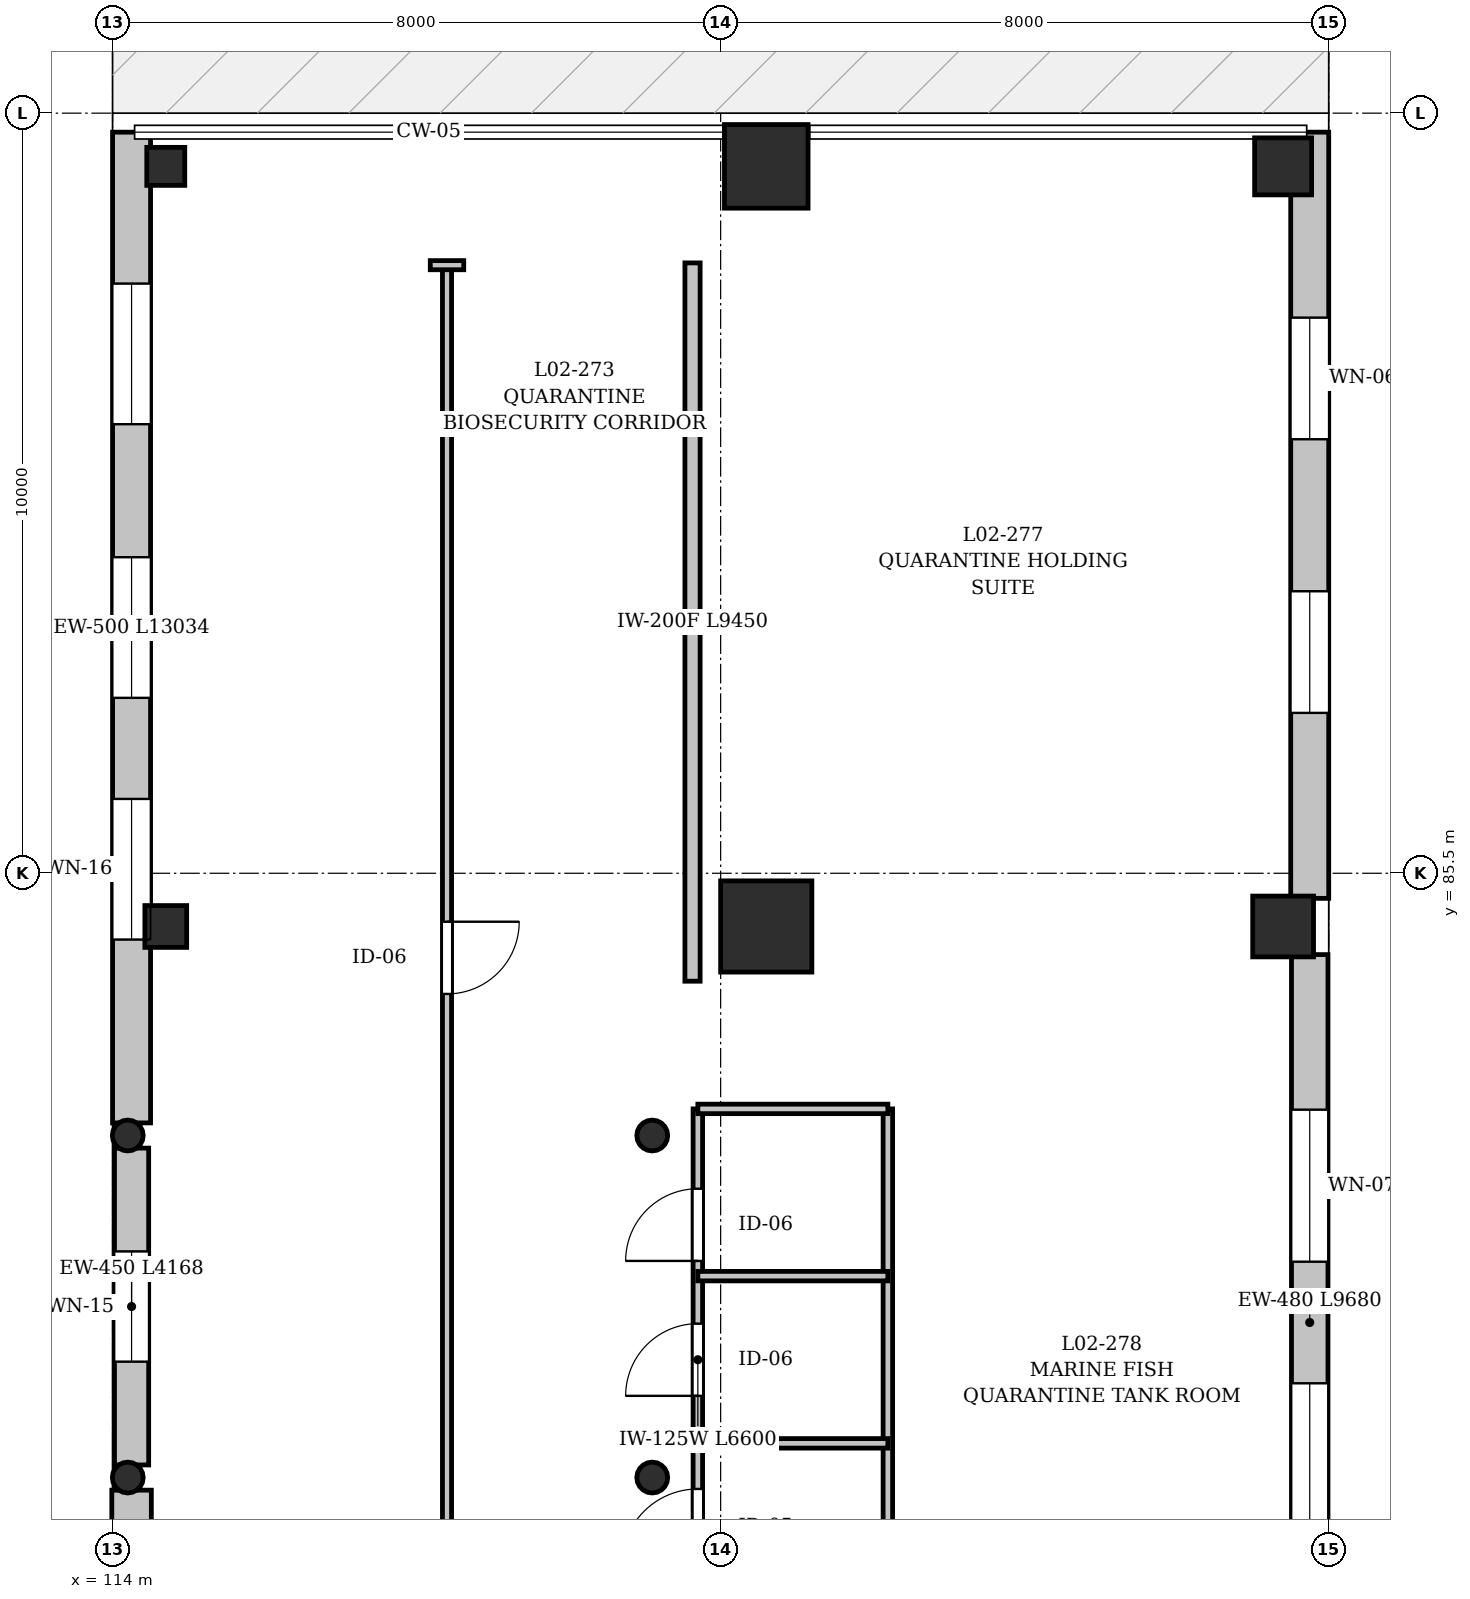
"""IFC4 building model, lengths in metres.
Left out: names, types, materials, properties, quantities, classifications, styles, units other than length and angle.
Written with IfcOpenShell. Run it as: python <this file> out.ifc"""

import sys

from ifc_helpers import new_model, si_unit, direction, frame, frame_2d, origin, origin_2d, place, context, subcontext, project, spatial, rectangle, hollow_circle, extrude, element, fill, save


model = new_model("IFC4")
c1 = context("Model", 3, precision=1e-05, world=origin(), true_north=direction((0.0, 1.0)))
c2 = subcontext(c1, "Body", "Model", "MODEL_VIEW")
j1 = project(units=[si_unit("LENGTHUNIT", "METRE"), si_unit("PLANEANGLEUNIT", "RADIAN")], contexts=[c1])
p1 = place(None, origin())
s1 = spatial("IfcSite", under=j1, at=p1, CompositionType="ELEMENT")
p2 = place(p1, origin())
s2 = spatial("IfcBuilding", under=s1, at=p2, CompositionType="ELEMENT")
p3 = place(p2, frame((0.0, 0.0, 5.4)))
s3 = spatial("IfcBuildingStorey", under=s2, at=p3, CompositionType="ELEMENT", Elevation=5.4)
p4 = place(p3, frame((114.7, 84.8, 0.0), z_axis=(0.0, 0.0, 1.0), x_axis=(1.0, 0.0, 0.0)))
e1 = element("IfcColumn", 1, at=p4, inside=s3, PredefinedType="COLUMN", context=c2, shape_type="SweptSolid", body=[
    extrude(rectangle(XDim=0.55, YDim=0.55, at=origin_2d()), origin(), (0.0, 0.0, 1.0), 4.45),
])
p5 = place(p3, frame((114.7, 94.8, 0.0), z_axis=(0.0, 0.0, 1.0), x_axis=(1.0, 0.0, 0.0)))
e2 = element("IfcColumn", 2, at=p5, inside=s3, PredefinedType="COLUMN", context=c2, shape_type="SweptSolid", body=[
    extrude(rectangle(XDim=0.5, YDim=0.5, at=origin_2d()), origin(), (0.0, 0.0, 1.0), 4.45),
])
p6 = place(p3, frame((122.6, 84.8, 0.0), z_axis=(0.0, 0.0, 1.0), x_axis=(1.0, 0.0, 0.0)))
e3 = element("IfcColumn", 3, at=p6, inside=s3, PredefinedType="COLUMN", context=c2, shape_type="SweptSolid", body=[
    extrude(rectangle(XDim=1.2, YDim=1.2, at=origin_2d()), origin(), (0.0, 0.0, 1.0), 4.45),
])
p7 = place(p3, frame((122.6, 94.8, 0.0), z_axis=(0.0, 0.0, 1.0), x_axis=(1.0, 0.0, 0.0)))
e4 = element("IfcColumn", 4, at=p7, inside=s3, PredefinedType="COLUMN", context=c2, shape_type="SweptSolid", body=[
    extrude(rectangle(XDim=1.1, YDim=1.1, at=origin_2d()), origin(), (0.0, 0.0, 1.0), 4.45),
])
p8 = place(p3, frame((129.4, 84.8, 0.0), z_axis=(0.0, 0.0, 1.0), x_axis=(1.0, 0.0, 0.0)))
e5 = element("IfcColumn", 5, at=p8, inside=s3, PredefinedType="COLUMN", context=c2, shape_type="SweptSolid", body=[
    extrude(rectangle(XDim=0.8, YDim=0.8, at=origin_2d()), origin(), (0.0, 0.0, 1.0), 4.45),
])
p9 = place(p3, frame((129.4, 94.8, 0.0), z_axis=(0.0, 0.0, 1.0), x_axis=(1.0, 0.0, 0.0)))
e6 = element("IfcColumn", 6, at=p9, inside=s3, PredefinedType="COLUMN", context=c2, shape_type="SweptSolid", body=[
    extrude(rectangle(XDim=0.75, YDim=0.75, at=origin_2d()), origin(), (0.0, 0.0, 1.0), 4.45),
])
for number, where, z_axis, x_axis in (
    (7, (114.2, 77.55, 0.0), (0.0, 0.0, 1.0), (1.0, 0.0, 0.0)),
    (8, (114.2, 82.05, 0.0), (0.0, 0.0, 1.0), (1.0, 0.0, 0.0)),
    (9, (121.1, 77.55, 0.0), (0.0, 0.0, 1.0), (1.0, 0.0, 0.0)),
    (10, (121.1, 82.05, 0.0), (0.0, 0.0, 1.0), (1.0, 0.0, 0.0)),
):
    element("IfcColumn", number, at=place(p3, frame(where, z_axis=z_axis, x_axis=x_axis)), inside=s3, PredefinedType="COLUMN", context=c2, shape_type="SweptSolid", body=[
        extrude(hollow_circle(Radius=0.203, WallThickness=0.016, at=origin_2d()), origin(), (0.0, 0.0, 1.0), 4.8),
    ])
p10 = place(p3, frame((114.25, 56.25, 0.0), z_axis=(0.0, 0.0, 1.0), x_axis=(0.0, 1.0, 0.0)))
e11 = element("IfcWall", 11, at=p10, inside=s3, PredefinedType="SOLIDWALL", context=c2, shape_type="SweptSolid", body=[
    extrude(rectangle(XDim=21.134, YDim=0.52, at=frame_2d((10.567, 0.0))), origin(), (0.0, 0.0, 1.0), 3.34),
])
p11 = place(p10, frame((4.167, 0.0, 0.9)))
e12 = element("IfcOpeningElement", 12, at=p11, cuts=e11, PredefinedType="OPENING", context=c2, shape_type="SweptSolid", body=[
    extrude(rectangle(XDim=2.0, YDim=1.6, at=frame_2d((1.0, 0.8))), frame((0.0, 0.27, 0.0), z_axis=(0.0, -1.0, 0.0), x_axis=(1.0, 0.0, 0.0)), (0.0, 0.0, 1.0), 0.54),
])
p12 = place(p10, frame((7.767, 0.0, 0.9)))
e13 = element("IfcOpeningElement", 13, at=p12, cuts=e11, PredefinedType="OPENING", context=c2, shape_type="SweptSolid", body=[
    extrude(rectangle(XDim=2.0, YDim=1.6, at=frame_2d((1.0, 0.8))), frame((0.0, 0.27, 0.0), z_axis=(0.0, -1.0, 0.0), x_axis=(1.0, 0.0, 0.0)), (0.0, 0.0, 1.0), 0.54),
])
p13 = place(p10, frame((11.367, 0.0, 0.9)))
e14 = element("IfcOpeningElement", 14, at=p13, cuts=e11, PredefinedType="OPENING", context=c2, shape_type="SweptSolid", body=[
    extrude(rectangle(XDim=2.0, YDim=1.6, at=frame_2d((1.0, 0.8))), frame((0.0, 0.27, 0.0), z_axis=(0.0, -1.0, 0.0), x_axis=(1.0, 0.0, 0.0)), (0.0, 0.0, 1.0), 0.54),
])
p14 = place(p10, frame((14.967, 0.0, 0.9)))
e15 = element("IfcOpeningElement", 15, at=p14, cuts=e11, PredefinedType="OPENING", context=c2, shape_type="SweptSolid", body=[
    extrude(rectangle(XDim=2.0, YDim=1.6, at=frame_2d((1.0, 0.8))), frame((0.0, 0.27, 0.0), z_axis=(0.0, -1.0, 0.0), x_axis=(1.0, 0.0, 0.0)), (0.0, 0.0, 1.0), 0.54),
])
p15 = place(p3, frame((114.25, 77.716, 0.0), z_axis=(0.0, 0.0, 1.0), x_axis=(0.0, 1.0, 0.0)))
e16 = element("IfcWall", 16, at=p15, inside=s3, PredefinedType="SOLIDWALL", context=c2, shape_type="SweptSolid", body=[
    extrude(rectangle(XDim=4.168, YDim=0.45, at=frame_2d((2.084, 0.0))), origin(), (0.0, 0.0, 1.0), 3.79),
])
p16 = place(p15, frame((1.359, 0.0, 0.9)))
e17 = element("IfcOpeningElement", 17, at=p16, cuts=e16, PredefinedType="OPENING", context=c2, shape_type="SweptSolid", body=[
    extrude(rectangle(XDim=1.45, YDim=1.5, at=frame_2d((0.725, 0.75))), frame((0.0, 0.235, 0.0), z_axis=(0.0, -1.0, 0.0), x_axis=(1.0, 0.0, 0.0)), (0.0, 0.0, 1.0), 0.47),
])
p17 = place(p3, frame((114.25, 82.216, 0.0), z_axis=(0.0, 0.0, 1.0), x_axis=(0.0, 1.0, 0.0)))
e18 = element("IfcWall", 18, at=p17, inside=s3, PredefinedType="SOLIDWALL", context=c2, shape_type="SweptSolid", body=[
    extrude(rectangle(XDim=13.034, YDim=0.5, at=frame_2d((6.517, 0.0))), origin(), (0.0, 0.0, 1.0), 3.49),
])
p18 = place(p17, frame((2.412, 0.0, 0.9)))
e19 = element("IfcOpeningElement", 19, at=p18, cuts=e18, PredefinedType="OPENING", context=c2, shape_type="SweptSolid", body=[
    extrude(rectangle(XDim=1.85, YDim=1.5, at=frame_2d((0.925, 0.75))), frame((0.0, 0.26, 0.0), z_axis=(0.0, -1.0, 0.0), x_axis=(1.0, 0.0, 0.0)), (0.0, 0.0, 1.0), 0.52),
])
p19 = place(p17, frame((5.592, 0.0, 0.9)))
e20 = element("IfcOpeningElement", 20, at=p19, cuts=e18, PredefinedType="OPENING", context=c2, shape_type="SweptSolid", body=[
    extrude(rectangle(XDim=1.85, YDim=1.5, at=frame_2d((0.925, 0.75))), frame((0.0, 0.26, 0.0), z_axis=(0.0, -1.0, 0.0), x_axis=(1.0, 0.0, 0.0)), (0.0, 0.0, 1.0), 0.52),
])
p20 = place(p17, frame((9.192, 0.0, 0.9)))
e21 = element("IfcOpeningElement", 21, at=p20, cuts=e18, PredefinedType="OPENING", context=c2, shape_type="SweptSolid", body=[
    extrude(rectangle(XDim=1.85, YDim=1.5, at=frame_2d((0.925, 0.75))), frame((0.0, 0.26, 0.0), z_axis=(0.0, -1.0, 0.0), x_axis=(1.0, 0.0, 0.0)), (0.0, 0.0, 1.0), 0.52),
])
p21 = place(p3, frame((129.75, 95.25, 0.0), z_axis=(0.0, 0.0, 1.0), x_axis=(0.0, -1.0, 0.0)))
e22 = element("IfcWall", 22, at=p21, inside=s3, PredefinedType="SOLIDWALL", context=c2, shape_type="SweptSolid", body=[
    extrude(rectangle(XDim=10.08, YDim=0.5, at=frame_2d((5.04, 0.0))), origin(), (0.0, 0.0, 1.0), 3.14),
])
p22 = place(p21, frame((2.44, 0.0, 0.9)))
e23 = element("IfcOpeningElement", 23, at=p22, cuts=e22, PredefinedType="OPENING", context=c2, shape_type="SweptSolid", body=[
    extrude(rectangle(XDim=1.6, YDim=1.6, at=frame_2d((0.8, 0.8))), frame((0.0, 0.26, 0.0), z_axis=(0.0, -1.0, 0.0), x_axis=(1.0, 0.0, 0.0)), (0.0, 0.0, 1.0), 0.52),
])
p23 = place(p21, frame((6.04, 0.0, 0.9)))
e24 = element("IfcOpeningElement", 24, at=p23, cuts=e22, PredefinedType="OPENING", context=c2, shape_type="SweptSolid", body=[
    extrude(rectangle(XDim=1.6, YDim=1.6, at=frame_2d((0.8, 0.8))), frame((0.0, 0.26, 0.0), z_axis=(0.0, -1.0, 0.0), x_axis=(1.0, 0.0, 0.0)), (0.0, 0.0, 1.0), 0.52),
])
p24 = place(p3, frame((129.75, 84.43, 0.0), z_axis=(0.0, 0.0, 1.0), x_axis=(0.0, -1.0, 0.0)))
e25 = element("IfcWall", 25, at=p24, inside=s3, PredefinedType="SOLIDWALL", context=c2, shape_type="SweptSolid", body=[
    extrude(rectangle(XDim=9.68, YDim=0.48, at=frame_2d((4.84, 0.0))), origin(), (0.0, 0.0, 1.0), 3.24),
])
p25 = place(p24, frame((2.04, 0.0, 0.9)))
e26 = element("IfcOpeningElement", 26, at=p25, cuts=e25, PredefinedType="OPENING", context=c2, shape_type="SweptSolid", body=[
    extrude(rectangle(XDim=2.0, YDim=1.6, at=frame_2d((1.0, 0.8))), frame((0.0, 0.25, 0.0), z_axis=(0.0, -1.0, 0.0), x_axis=(1.0, 0.0, 0.0)), (0.0, 0.0, 1.0), 0.5),
])
p26 = place(p24, frame((5.64, 0.0, 0.9)))
e27 = element("IfcOpeningElement", 27, at=p26, cuts=e25, PredefinedType="OPENING", context=c2, shape_type="SweptSolid", body=[
    extrude(rectangle(XDim=2.0, YDim=1.6, at=frame_2d((1.0, 0.8))), frame((0.0, 0.25, 0.0), z_axis=(0.0, -1.0, 0.0), x_axis=(1.0, 0.0, 0.0)), (0.0, 0.0, 1.0), 0.5),
])
p27 = place(p3, frame((121.7, 75.8, 0.0), z_axis=(0.0, 0.0, 1.0), x_axis=(0.0, 1.0, 0.0)))
e28 = element("IfcWall", 28, at=p27, inside=s3, PredefinedType="PARTITIONING", context=c2, shape_type="SweptSolid", body=[
    extrude(rectangle(XDim=6.6, YDim=0.125, at=frame_2d((3.3, 0.0))), origin(), (0.0, 0.0, 1.0), 4.45),
])
p28 = place(p27, frame((0.6, 0.0, 0.0)))
e29 = element("IfcOpeningElement", 29, at=p28, cuts=e28, PredefinedType="OPENING", context=c2, shape_type="SweptSolid", body=[
    extrude(rectangle(XDim=1.0, YDim=2.2, at=frame_2d((0.5, 1.1))), frame((0.0, 0.073, 0.0), z_axis=(0.0, -1.0, 0.0), x_axis=(1.0, 0.0, 0.0)), (0.0, 0.0, 1.0), 0.145),
])
p29 = place(p27, frame((2.825, 0.0, 0.0)))
e30 = element("IfcOpeningElement", 30, at=p29, cuts=e28, PredefinedType="OPENING", context=c2, shape_type="SweptSolid", body=[
    extrude(rectangle(XDim=0.95, YDim=2.2, at=frame_2d((0.475, 1.1))), frame((0.0, 0.073, 0.0), z_axis=(0.0, -1.0, 0.0), x_axis=(1.0, 0.0, 0.0)), (0.0, 0.0, 1.0), 0.145),
])
p30 = place(p27, frame((4.6, 0.0, 0.0)))
e31 = element("IfcOpeningElement", 31, at=p30, cuts=e28, PredefinedType="OPENING", context=c2, shape_type="SweptSolid", body=[
    extrude(rectangle(XDim=0.95, YDim=2.2, at=frame_2d((0.475, 1.1))), frame((0.0, 0.073, 0.0), z_axis=(0.0, -1.0, 0.0), x_axis=(1.0, 0.0, 0.0)), (0.0, 0.0, 1.0), 0.145),
])
p31 = place(p3, frame((124.2, 75.8, 0.0), z_axis=(0.0, 0.0, 1.0), x_axis=(0.0, 1.0, 0.0)))
e32 = element("IfcWall", 32, at=p31, inside=s3, PredefinedType="PARTITIONING", context=c2, shape_type="SweptSolid", body=[
    extrude(rectangle(XDim=6.6, YDim=0.125, at=frame_2d((3.3, 0.0))), origin(), (0.0, 0.0, 1.0), 4.45),
])
for number, where, z_axis, x_axis in (
    (33, (121.7, 82.4, 0.0), (0.0, 0.0, 1.0), (1.0, 0.0, 0.0)),
    (34, (121.7, 78.0, 0.0), (0.0, 0.0, 1.0), (1.0, 0.0, 0.0)),
    (35, (121.7, 80.2, 0.0), (0.0, 0.0, 1.0), (1.0, 0.0, 0.0)),
):
    element("IfcWall", number, at=place(p3, frame(where, z_axis=z_axis, x_axis=x_axis)), inside=s3, PredefinedType="PARTITIONING", context=c2, shape_type="SweptSolid", body=[
        extrude(rectangle(XDim=2.5, YDim=0.125, at=frame_2d((1.25, 0.0))), origin(), (0.0, 0.0, 1.0), 3.75),
    ])
p32 = place(p3, frame((118.4, 93.5, 0.0), z_axis=(0.0, 0.0, 1.0), x_axis=(0.0, -1.0, 0.0)))
e36 = element("IfcWall", 36, at=p32, inside=s3, PredefinedType="PARTITIONING", context=c2, shape_type="SweptSolid", body=[
    extrude(rectangle(XDim=35.5, YDim=0.12, at=frame_2d((17.75, 0.0))), origin(), (0.0, 0.0, 1.0), 3.44),
])
p33 = place(p32, frame((17.275, 0.0, 0.0)))
e37 = element("IfcOpeningElement", 37, at=p33, cuts=e36, PredefinedType="OPENING", context=c2, shape_type="SweptSolid", body=[
    extrude(rectangle(XDim=0.95, YDim=2.2, at=frame_2d((0.475, 1.1))), frame((0.0, 0.07, 0.0), z_axis=(0.0, -1.0, 0.0), x_axis=(1.0, 0.0, 0.0)), (0.0, 0.0, 1.0), 0.14),
])
p34 = place(p32, frame((8.637, 0.0, 0.0)))
e38 = element("IfcOpeningElement", 38, at=p34, cuts=e36, PredefinedType="OPENING", context=c2, shape_type="SweptSolid", body=[
    extrude(rectangle(XDim=0.95, YDim=2.2, at=frame_2d((0.475, 1.1))), frame((0.0, 0.07, 0.0), z_axis=(0.0, -1.0, 0.0), x_axis=(1.0, 0.0, 0.0)), (0.0, 0.0, 1.0), 0.14),
])
p35 = place(p3, frame((121.63, 93.53, 0.0), z_axis=(0.0, 0.0, 1.0), x_axis=(0.0, -1.0, 0.0)))
e39 = element("IfcWall", 39, at=p35, inside=s3, PredefinedType="PARTITIONING", context=c2, shape_type="SweptSolid", body=[
    extrude(rectangle(XDim=9.45, YDim=0.2, at=frame_2d((4.725, 0.0))), origin(), (0.0, 0.0, 1.0), 3.54),
])
p36 = place(p3, frame((118.18, 93.5, 0.0), z_axis=(0.0, 0.0, 1.0), x_axis=(1.0, 0.0, 0.0)))
e40 = element("IfcWall", 40, at=p36, inside=s3, PredefinedType="PARTITIONING", context=c2, shape_type="SweptSolid", body=[
    extrude(rectangle(XDim=0.44, YDim=0.12, at=frame_2d((0.22, 0.0))), origin(), (0.0, 0.0, 1.0), 4.45),
])
p37 = place(p16, origin())
e41 = element("IfcWindow", 41, at=p37, inside=s3, PartitioningType="DOUBLE_PANEL_VERTICAL", PredefinedType="WINDOW", context=c2, shape_type="SweptSolid", body=[
    extrude(rectangle(XDim=1.45, YDim=1.5, at=frame_2d((0.725, 0.75))), frame((0.0, 0.03, 0.0), z_axis=(0.0, -1.0, 0.0), x_axis=(1.0, 0.0, 0.0)), (0.0, 0.0, 1.0), 0.06),
])
fill(e17, e41)
p38 = place(p18, origin())
e42 = element("IfcWindow", 42, at=p38, inside=s3, PartitioningType="DOUBLE_PANEL_VERTICAL", PredefinedType="WINDOW", context=c2, shape_type="SweptSolid", body=[
    extrude(rectangle(XDim=1.85, YDim=1.5, at=frame_2d((0.925, 0.75))), frame((0.0, 0.03, 0.0), z_axis=(0.0, -1.0, 0.0), x_axis=(1.0, 0.0, 0.0)), (0.0, 0.0, 1.0), 0.06),
])
fill(e19, e42)
p39 = place(p19, origin())
e43 = element("IfcWindow", 43, at=p39, inside=s3, PartitioningType="DOUBLE_PANEL_VERTICAL", PredefinedType="WINDOW", context=c2, shape_type="SweptSolid", body=[
    extrude(rectangle(XDim=1.85, YDim=1.5, at=frame_2d((0.925, 0.75))), frame((0.0, 0.03, 0.0), z_axis=(0.0, -1.0, 0.0), x_axis=(1.0, 0.0, 0.0)), (0.0, 0.0, 1.0), 0.06),
])
fill(e20, e43)
p40 = place(p20, origin())
e44 = element("IfcWindow", 44, at=p40, inside=s3, PartitioningType="DOUBLE_PANEL_VERTICAL", PredefinedType="WINDOW", context=c2, shape_type="SweptSolid", body=[
    extrude(rectangle(XDim=1.85, YDim=1.5, at=frame_2d((0.925, 0.75))), frame((0.0, 0.03, 0.0), z_axis=(0.0, -1.0, 0.0), x_axis=(1.0, 0.0, 0.0)), (0.0, 0.0, 1.0), 0.06),
])
fill(e21, e44)
p41 = place(p22, origin())
e45 = element("IfcWindow", 45, at=p41, inside=s3, PartitioningType="DOUBLE_PANEL_VERTICAL", PredefinedType="WINDOW", context=c2, shape_type="SweptSolid", body=[
    extrude(rectangle(XDim=1.6, YDim=1.6, at=frame_2d((0.8, 0.8))), frame((0.0, 0.03, 0.0), z_axis=(0.0, -1.0, 0.0), x_axis=(1.0, 0.0, 0.0)), (0.0, 0.0, 1.0), 0.06),
])
fill(e23, e45)
p42 = place(p23, origin())
e46 = element("IfcWindow", 46, at=p42, inside=s3, PartitioningType="DOUBLE_PANEL_VERTICAL", PredefinedType="WINDOW", context=c2, shape_type="SweptSolid", body=[
    extrude(rectangle(XDim=1.6, YDim=1.6, at=frame_2d((0.8, 0.8))), frame((0.0, 0.03, 0.0), z_axis=(0.0, -1.0, 0.0), x_axis=(1.0, 0.0, 0.0)), (0.0, 0.0, 1.0), 0.06),
])
fill(e24, e46)
p43 = place(p25, origin())
e47 = element("IfcWindow", 47, at=p43, inside=s3, PartitioningType="TRIPLE_PANEL_VERTICAL", PredefinedType="WINDOW", context=c2, shape_type="SweptSolid", body=[
    extrude(rectangle(XDim=2.0, YDim=1.6, at=frame_2d((1.0, 0.8))), frame((0.0, 0.03, 0.0), z_axis=(0.0, -1.0, 0.0), x_axis=(1.0, 0.0, 0.0)), (0.0, 0.0, 1.0), 0.06),
])
fill(e26, e47)
p44 = place(p26, origin())
e48 = element("IfcWindow", 48, at=p44, inside=s3, PartitioningType="TRIPLE_PANEL_VERTICAL", PredefinedType="WINDOW", context=c2, shape_type="SweptSolid", body=[
    extrude(rectangle(XDim=2.0, YDim=1.6, at=frame_2d((1.0, 0.8))), frame((0.0, 0.03, 0.0), z_axis=(0.0, -1.0, 0.0), x_axis=(1.0, 0.0, 0.0)), (0.0, 0.0, 1.0), 0.06),
])
fill(e27, e48)
p45 = place(p28, origin())
e49 = element("IfcDoor", 49, at=p45, inside=s3, OperationType="SINGLE_SWING_LEFT", PredefinedType="DOOR", context=c2, shape_type="SweptSolid", body=[
    extrude(rectangle(XDim=1.0, YDim=2.2, at=frame_2d((0.5, 1.1))), frame((0.0, 0.025, 0.0), z_axis=(0.0, -1.0, 0.0), x_axis=(1.0, 0.0, 0.0)), (0.0, 0.0, 1.0), 0.05),
])
fill(e29, e49)
p46 = place(p29, origin())
e50 = element("IfcDoor", 50, at=p46, inside=s3, OperationType="SINGLE_SWING_RIGHT", PredefinedType="DOOR", context=c2, shape_type="SweptSolid", body=[
    extrude(rectangle(XDim=0.95, YDim=2.2, at=frame_2d((0.475, 1.1))), frame((0.0, 0.025, 0.0), z_axis=(0.0, -1.0, 0.0), x_axis=(1.0, 0.0, 0.0)), (0.0, 0.0, 1.0), 0.05),
])
fill(e30, e50)
p47 = place(p30, origin())
e51 = element("IfcDoor", 51, at=p47, inside=s3, OperationType="SINGLE_SWING_LEFT", PredefinedType="DOOR", context=c2, shape_type="SweptSolid", body=[
    extrude(rectangle(XDim=0.95, YDim=2.2, at=frame_2d((0.475, 1.1))), frame((0.0, 0.025, 0.0), z_axis=(0.0, -1.0, 0.0), x_axis=(1.0, 0.0, 0.0)), (0.0, 0.0, 1.0), 0.05),
])
fill(e31, e51)
p48 = place(p34, origin())
e52 = element("IfcDoor", 52, at=p48, inside=s3, OperationType="SINGLE_SWING_RIGHT", PredefinedType="DOOR", context=c2, shape_type="SweptSolid", body=[
    extrude(rectangle(XDim=0.95, YDim=2.2, at=frame_2d((0.475, 1.1))), frame((0.0, 0.025, 0.0), z_axis=(0.0, -1.0, 0.0), x_axis=(1.0, 0.0, 0.0)), (0.0, 0.0, 1.0), 0.05),
])
fill(e38, e52)
save(model, sys.argv[1])
